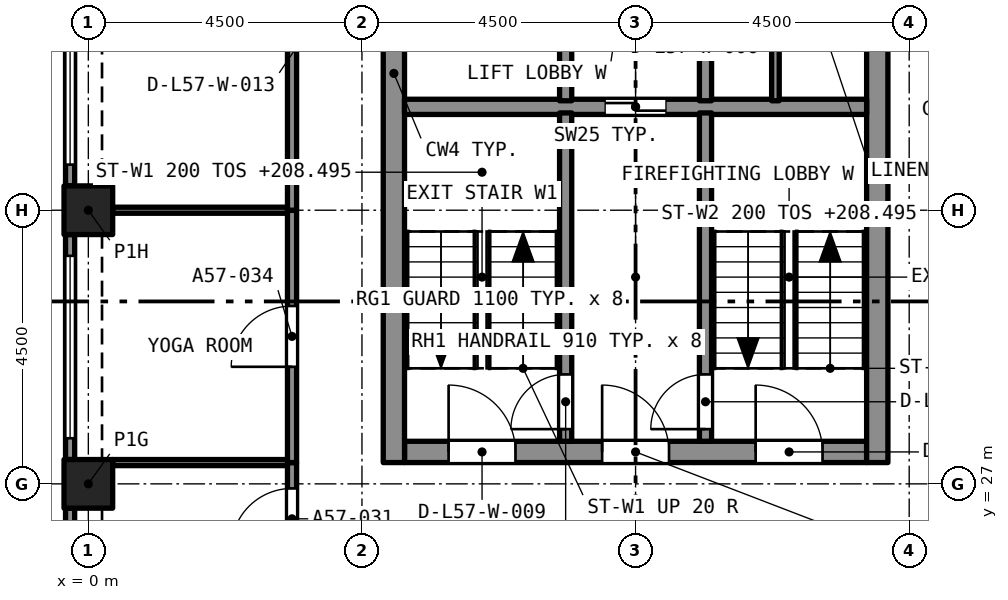
"""IFC4 building model, lengths in metres.
Left out: names, types, materials, properties, quantities, classifications, styles, units other than length and angle.
Written with IfcOpenShell. Run it as: python <this file> out.ifc"""

import sys

from ifc_helpers import new_model, si_unit, direction, frame, frame_2d, origin, origin_2d, place, context, subcontext, project, spatial, rectangle, extrude, element, fill, save


model = new_model("IFC4")
c1 = context("Model", 3, precision=1e-05, world=origin(), true_north=direction((0.0, 1.0)))
c2 = subcontext(c1, "Body", "Model", "MODEL_VIEW")
j1 = project(units=[si_unit("LENGTHUNIT", "METRE"), si_unit("PLANEANGLEUNIT", "RADIAN")], contexts=[c1])
p1 = place(None, origin())
s1 = spatial("IfcSite", under=j1, at=p1, CompositionType="ELEMENT")
p2 = place(p1, origin())
s2 = spatial("IfcBuilding", under=s1, at=p2, CompositionType="ELEMENT")
p3 = place(p2, frame((0.0, 0.0, 206.895)))
s3 = spatial("IfcBuildingStorey", under=s2, at=p3, CompositionType="ELEMENT", Elevation=206.895)
for number, where, z_axis, x_axis in (
    (1, (0.0, 27.0, 0.0), (0.0, 0.0, 1.0), (1.0, 0.0, 0.0)),
    (2, (0.0, 31.5, 0.0), (0.0, 0.0, 1.0), (1.0, 0.0, 0.0)),
):
    element("IfcColumn", number, at=place(p3, frame(where, z_axis=z_axis, x_axis=x_axis)), inside=s3, PredefinedType="COLUMN", context=c2, shape_type="SweptSolid", body=[
        extrude(rectangle(XDim=0.8, YDim=0.8, at=origin_2d()), origin(), (0.0, 0.0, 1.0), 3.2),
    ])
p4 = place(p3, frame((5.2, 27.525, 0.0), z_axis=(0.0, 0.0, 1.0), x_axis=(1.0, 0.0, 0.0)))
e3 = element("IfcWall", 3, at=p4, inside=s3, PredefinedType="SOLIDWALL", context=c2, shape_type="SweptSolid", body=[
    extrude(rectangle(XDim=7.6, YDim=0.35, at=frame_2d((3.8, 0.0))), origin(), (0.0, 0.0, 1.0), 3.2),
])
p5 = place(p4, frame((0.725, 0.0, 0.0)))
e4 = element("IfcOpeningElement", 4, at=p5, cuts=e3, PredefinedType="OPENING", context=c2, shape_type="SweptSolid", body=[
    extrude(rectangle(XDim=1.1, YDim=2.1, at=frame_2d((0.55, 1.05))), frame((0.0, 0.185, 0.0), z_axis=(0.0, -1.0, 0.0), x_axis=(1.0, 0.0, 0.0)), (0.0, 0.0, 1.0), 0.37),
])
p6 = place(p4, frame((3.25, 0.0, 0.0)))
e5 = element("IfcOpeningElement", 5, at=p6, cuts=e3, PredefinedType="OPENING", context=c2, shape_type="SweptSolid", body=[
    extrude(rectangle(XDim=1.1, YDim=2.1, at=frame_2d((0.55, 1.05))), frame((0.0, 0.185, 0.0), z_axis=(0.0, -1.0, 0.0), x_axis=(1.0, 0.0, 0.0)), (0.0, 0.0, 1.0), 0.37),
])
p7 = place(p4, frame((5.775, 0.0, 0.0)))
e6 = element("IfcOpeningElement", 6, at=p7, cuts=e3, PredefinedType="OPENING", context=c2, shape_type="SweptSolid", body=[
    extrude(rectangle(XDim=1.1, YDim=2.1, at=frame_2d((0.55, 1.05))), frame((0.0, 0.185, 0.0), z_axis=(0.0, -1.0, 0.0), x_axis=(1.0, 0.0, 0.0)), (0.0, 0.0, 1.0), 0.37),
])
p8 = place(p3, frame((5.025, 27.35, 0.0), z_axis=(0.0, 0.0, 1.0), x_axis=(0.0, 1.0, 0.0)))
e7 = element("IfcWall", 7, at=p8, inside=s3, PredefinedType="SOLIDWALL", context=c2, shape_type="SweptSolid", body=[
    extrude(rectangle(XDim=12.8, YDim=0.35, at=frame_2d((6.4, 0.0))), origin(), (0.0, 0.0, 1.0), 3.2),
])
p9 = place(p8, frame((8.6, 0.0, 0.0)))
e8 = element("IfcOpeningElement", 8, at=p9, cuts=e7, PredefinedType="OPENING", context=c2, shape_type="SweptSolid", body=[
    extrude(rectangle(XDim=1.2, YDim=2.1, at=frame_2d((0.6, 1.05))), frame((0.0, 0.185, 0.0), z_axis=(0.0, -1.0, 0.0), x_axis=(1.0, 0.0, 0.0)), (0.0, 0.0, 1.0), 0.37),
])
p10 = place(p3, frame((12.975, 27.35, 0.0), z_axis=(0.0, 0.0, 1.0), x_axis=(0.0, 1.0, 0.0)))
e9 = element("IfcWall", 9, at=p10, inside=s3, PredefinedType="SOLIDWALL", context=c2, shape_type="SweptSolid", body=[
    extrude(rectangle(XDim=12.8, YDim=0.35, at=frame_2d((6.4, 0.0))), origin(), (0.0, 0.0, 1.0), 3.2),
])
p11 = place(p10, frame((10.75, 0.0, 0.0)))
e10 = element("IfcOpeningElement", 10, at=p11, cuts=e9, PredefinedType="OPENING", context=c2, shape_type="SweptSolid", body=[
    extrude(rectangle(XDim=1.1, YDim=2.1, at=frame_2d((0.55, 1.05))), frame((0.0, 0.185, 0.0), z_axis=(0.0, -1.0, 0.0), x_axis=(1.0, 0.0, 0.0)), (0.0, 0.0, 1.0), 0.37),
])
p12 = place(p10, frame((8.6, 0.0, 0.0)))
e11 = element("IfcOpeningElement", 11, at=p12, cuts=e9, PredefinedType="OPENING", context=c2, shape_type="SweptSolid", body=[
    extrude(rectangle(XDim=1.2, YDim=2.1, at=frame_2d((0.6, 1.05))), frame((0.0, 0.185, 0.0), z_axis=(0.0, -1.0, 0.0), x_axis=(1.0, 0.0, 0.0)), (0.0, 0.0, 1.0), 0.37),
])
p13 = place(p3, frame((-0.3, 31.9, 0.0), z_axis=(0.0, 0.0, 1.0), x_axis=(0.0, 1.0, 0.0)))
e12 = element("IfcWall", 12, at=p13, inside=s3, PredefinedType="SOLIDWALL", context=c2, shape_type="SweptSolid", body=[
    extrude(rectangle(XDim=3.7, YDim=0.15, at=frame_2d((1.85, 0.0))), origin(), (0.0, 0.0, 1.0), 3.2),
])
p14 = place(p13, frame((0.35, 0.0, 0.45)))
e13 = element("IfcOpeningElement", 13, at=p14, cuts=e12, PredefinedType="OPENING", context=c2, shape_type="SweptSolid", body=[
    extrude(rectangle(XDim=3.0, YDim=1.95, at=frame_2d((1.5, 0.975))), frame((0.0, 0.085, 0.0), z_axis=(0.0, -1.0, 0.0), x_axis=(1.0, 0.0, 0.0)), (0.0, 0.0, 1.0), 0.17),
])
p15 = place(p3, frame((-0.3, 27.4, 0.0), z_axis=(0.0, 0.0, 1.0), x_axis=(0.0, 1.0, 0.0)))
e14 = element("IfcWall", 14, at=p15, inside=s3, PredefinedType="SOLIDWALL", context=c2, shape_type="SweptSolid", body=[
    extrude(rectangle(XDim=3.7, YDim=0.15, at=frame_2d((1.85, 0.0))), origin(), (0.0, 0.0, 1.0), 3.2),
])
p16 = place(p15, frame((0.35, 0.0, 0.45)))
e15 = element("IfcOpeningElement", 15, at=p16, cuts=e14, PredefinedType="OPENING", context=c2, shape_type="SweptSolid", body=[
    extrude(rectangle(XDim=3.0, YDim=1.95, at=frame_2d((1.5, 0.975))), frame((0.0, 0.085, 0.0), z_axis=(0.0, -1.0, 0.0), x_axis=(1.0, 0.0, 0.0)), (0.0, 0.0, 1.0), 0.17),
])
p17 = place(p3, frame((-0.3, 22.9, 0.0), z_axis=(0.0, 0.0, 1.0), x_axis=(0.0, 1.0, 0.0)))
e16 = element("IfcWall", 16, at=p17, inside=s3, PredefinedType="SOLIDWALL", context=c2, shape_type="SweptSolid", body=[
    extrude(rectangle(XDim=3.7, YDim=0.15, at=frame_2d((1.85, 0.0))), origin(), (0.0, 0.0, 1.0), 3.2),
])
p18 = place(p17, frame((0.35, 0.0, 0.45)))
e17 = element("IfcOpeningElement", 17, at=p18, cuts=e16, PredefinedType="OPENING", context=c2, shape_type="SweptSolid", body=[
    extrude(rectangle(XDim=3.0, YDim=1.95, at=frame_2d((1.5, 0.975))), frame((0.0, 0.085, 0.0), z_axis=(0.0, -1.0, 0.0), x_axis=(1.0, 0.0, 0.0)), (0.0, 0.0, 1.0), 0.17),
])
p19 = place(p3, frame((3.35, 25.425, 0.0), z_axis=(0.0, 0.0, 1.0), x_axis=(0.0, 1.0, 0.0)))
e18 = element("IfcWall", 18, at=p19, inside=s3, PredefinedType="PARTITIONING", context=c2, shape_type="SweptSolid", body=[
    extrude(rectangle(XDim=1.925, YDim=0.15, at=frame_2d((0.962, 0.0))), origin(), (0.0, 0.0, 1.0), 2.9),
])
p20 = place(p19, frame((0.5, 0.0, 0.0)))
e19 = element("IfcOpeningElement", 19, at=p20, cuts=e18, PredefinedType="OPENING", context=c2, shape_type="SweptSolid", body=[
    extrude(rectangle(XDim=1.0, YDim=2.1, at=frame_2d((0.5, 1.05))), frame((0.0, 0.085, 0.0), z_axis=(0.0, -1.0, 0.0), x_axis=(1.0, 0.0, 0.0)), (0.0, 0.0, 1.0), 0.17),
])
p21 = place(p3, frame((3.35, 27.35, 0.0), z_axis=(0.0, 0.0, 1.0), x_axis=(0.0, 1.0, 0.0)))
e20 = element("IfcWall", 20, at=p21, inside=s3, PredefinedType="PARTITIONING", context=c2, shape_type="SweptSolid", body=[
    extrude(rectangle(XDim=4.15, YDim=0.15, at=frame_2d((2.075, 0.0))), origin(), (0.0, 0.0, 1.0), 2.9),
])
p22 = place(p21, frame((1.575, 0.0, 0.0)))
e21 = element("IfcOpeningElement", 21, at=p22, cuts=e20, PredefinedType="OPENING", context=c2, shape_type="SweptSolid", body=[
    extrude(rectangle(XDim=1.0, YDim=2.1, at=frame_2d((0.5, 1.05))), frame((0.0, 0.085, 0.0), z_axis=(0.0, -1.0, 0.0), x_axis=(1.0, 0.0, 0.0)), (0.0, 0.0, 1.0), 0.17),
])
p23 = place(p3, frame((3.35, 31.5, 0.0), z_axis=(0.0, 0.0, 1.0), x_axis=(0.0, 1.0, 0.0)))
e22 = element("IfcWall", 22, at=p23, inside=s3, PredefinedType="PARTITIONING", context=c2, shape_type="SweptSolid", body=[
    extrude(rectangle(XDim=8.525, YDim=0.15, at=frame_2d((4.262, 0.0))), origin(), (0.0, 0.0, 1.0), 2.9),
])
p24 = place(p23, frame((3.825, 0.0, 0.0)))
e23 = element("IfcOpeningElement", 23, at=p24, cuts=e22, PredefinedType="OPENING", context=c2, shape_type="SweptSolid", body=[
    extrude(rectangle(XDim=1.0, YDim=2.1, at=frame_2d((0.5, 1.05))), frame((0.0, 0.085, 0.0), z_axis=(0.0, -1.0, 0.0), x_axis=(1.0, 0.0, 0.0)), (0.0, 0.0, 1.0), 0.17),
])
for number, where, z_axis, x_axis in (
    (24, (0.4, 27.35, 0.0), (0.0, 0.0, 1.0), (1.0, 0.0, 0.0)),
    (25, (0.4, 31.5, 0.0), (0.0, 0.0, 1.0), (1.0, 0.0, 0.0)),
):
    element("IfcWall", number, at=place(p3, frame(where, z_axis=z_axis, x_axis=x_axis)), inside=s3, PredefinedType="PARTITIONING", context=c2, shape_type="SweptSolid", body=[
        extrude(rectangle(XDim=2.875, YDim=0.1, at=frame_2d((1.438, 0.0))), origin(), (0.0, 0.0, 1.0), 2.9),
    ])
p25 = place(p3, frame((5.2, 33.2, 0.0), z_axis=(0.0, 0.0, 1.0), x_axis=(1.0, 0.0, 0.0)))
e26 = element("IfcWall", 26, at=p25, inside=s3, PredefinedType="SOLIDWALL", context=c2, shape_type="SweptSolid", body=[
    extrude(rectangle(XDim=7.6, YDim=0.25, at=frame_2d((3.8, 0.0))), origin(), (0.0, 0.0, 1.0), 2.9),
])
p26 = place(p25, frame((3.3, 0.0, 0.0)))
e27 = element("IfcOpeningElement", 27, at=p26, cuts=e26, PredefinedType="OPENING", context=c2, shape_type="SweptSolid", body=[
    extrude(rectangle(XDim=1.0, YDim=2.1, at=frame_2d((0.5, 1.05))), frame((0.0, 0.135, 0.0), z_axis=(0.0, -1.0, 0.0), x_axis=(1.0, 0.0, 0.0)), (0.0, 0.0, 1.0), 0.27),
])
p27 = place(p3, frame((7.85, 27.7, 0.0), z_axis=(0.0, 0.0, 1.0), x_axis=(0.0, 1.0, 0.0)))
e28 = element("IfcWall", 28, at=p27, inside=s3, PredefinedType="SOLIDWALL", context=c2, shape_type="SweptSolid", body=[
    extrude(rectangle(XDim=5.4, YDim=0.2, at=frame_2d((2.7, 0.0))), origin(), (0.0, 0.0, 1.0), 2.9),
])
p28 = place(p27, frame((0.2, 0.0, 0.0)))
e29 = element("IfcOpeningElement", 29, at=p28, cuts=e28, PredefinedType="OPENING", context=c2, shape_type="SweptSolid", body=[
    extrude(rectangle(XDim=0.9, YDim=2.1, at=frame_2d((0.45, 1.05))), frame((0.0, 0.11, 0.0), z_axis=(0.0, -1.0, 0.0), x_axis=(1.0, 0.0, 0.0)), (0.0, 0.0, 1.0), 0.22),
])
p29 = place(p3, frame((10.15, 27.7, 0.0), z_axis=(0.0, 0.0, 1.0), x_axis=(0.0, 1.0, 0.0)))
e30 = element("IfcWall", 30, at=p29, inside=s3, PredefinedType="SOLIDWALL", context=c2, shape_type="SweptSolid", body=[
    extrude(rectangle(XDim=5.4, YDim=0.2, at=frame_2d((2.7, 0.0))), origin(), (0.0, 0.0, 1.0), 2.9),
])
p30 = place(p29, frame((0.2, 0.0, 0.0)))
e31 = element("IfcOpeningElement", 31, at=p30, cuts=e30, PredefinedType="OPENING", context=c2, shape_type="SweptSolid", body=[
    extrude(rectangle(XDim=0.9, YDim=2.1, at=frame_2d((0.45, 1.05))), frame((0.0, 0.11, 0.0), z_axis=(0.0, -1.0, 0.0), x_axis=(1.0, 0.0, 0.0)), (0.0, 0.0, 1.0), 0.22),
])
for number, where, z_axis, x_axis in (
    (32, (7.85, 33.3, 0.0), (0.0, 0.0, 1.0), (0.0, 1.0, 0.0)),
    (33, (10.15, 33.3, 0.0), (0.0, 0.0, 1.0), (0.0, 1.0, 0.0)),
):
    element("IfcWall", number, at=place(p3, frame(where, z_axis=z_axis, x_axis=x_axis)), inside=s3, PredefinedType="SOLIDWALL", context=c2, shape_type="SweptSolid", body=[
        extrude(rectangle(XDim=2.3, YDim=0.2, at=frame_2d((1.15, 0.0))), origin(), (0.0, 0.0, 1.0), 2.9),
    ])
p31 = place(p3, frame((11.3, 33.3, 0.0), z_axis=(0.0, 0.0, 1.0), x_axis=(0.0, 1.0, 0.0)))
e34 = element("IfcWall", 34, at=p31, inside=s3, PredefinedType="PARTITIONING", context=c2, shape_type="SweptSolid", body=[
    extrude(rectangle(XDim=2.3, YDim=0.125, at=frame_2d((1.15, 0.0))), origin(), (0.0, 0.0, 1.0), 2.9),
])
p32 = place(p14, origin())
e35 = element("IfcWindow", 35, at=p32, inside=s3, PartitioningType="SINGLE_PANEL", PredefinedType="WINDOW", context=c2, shape_type="SweptSolid", body=[
    extrude(rectangle(XDim=3.0, YDim=1.95, at=frame_2d((1.5, 0.975))), frame((0.0, 0.03, 0.0), z_axis=(0.0, -1.0, 0.0), x_axis=(1.0, 0.0, 0.0)), (0.0, 0.0, 1.0), 0.06),
])
fill(e13, e35)
p33 = place(p16, origin())
e36 = element("IfcWindow", 36, at=p33, inside=s3, PartitioningType="SINGLE_PANEL", PredefinedType="WINDOW", context=c2, shape_type="SweptSolid", body=[
    extrude(rectangle(XDim=3.0, YDim=1.95, at=frame_2d((1.5, 0.975))), frame((0.0, 0.03, 0.0), z_axis=(0.0, -1.0, 0.0), x_axis=(1.0, 0.0, 0.0)), (0.0, 0.0, 1.0), 0.06),
])
fill(e15, e36)
p34 = place(p20, origin())
e37 = element("IfcDoor", 37, at=p34, inside=s3, OperationType="SINGLE_SWING_RIGHT", PredefinedType="DOOR", context=c2, shape_type="SweptSolid", body=[
    extrude(rectangle(XDim=1.0, YDim=2.1, at=frame_2d((0.5, 1.05))), frame((0.0, 0.025, 0.0), z_axis=(0.0, -1.0, 0.0), x_axis=(1.0, 0.0, 0.0)), (0.0, 0.0, 1.0), 0.05),
])
fill(e19, e37)
p35 = place(p22, origin())
e38 = element("IfcDoor", 38, at=p35, inside=s3, OperationType="SINGLE_SWING_RIGHT", PredefinedType="DOOR", context=c2, shape_type="SweptSolid", body=[
    extrude(rectangle(XDim=1.0, YDim=2.1, at=frame_2d((0.5, 1.05))), frame((0.0, 0.025, 0.0), z_axis=(0.0, -1.0, 0.0), x_axis=(1.0, 0.0, 0.0)), (0.0, 0.0, 1.0), 0.05),
])
fill(e21, e38)
p36 = place(p28, origin())
e39 = element("IfcDoor", 39, at=p36, inside=s3, OperationType="SINGLE_SWING_LEFT", PredefinedType="DOOR", context=c2, shape_type="SweptSolid", body=[
    extrude(rectangle(XDim=0.9, YDim=2.1, at=frame_2d((0.45, 1.05))), frame((0.0, 0.025, 0.0), z_axis=(0.0, -1.0, 0.0), x_axis=(1.0, 0.0, 0.0)), (0.0, 0.0, 1.0), 0.05),
])
fill(e29, e39)
p37 = place(p30, origin())
e40 = element("IfcDoor", 40, at=p37, inside=s3, OperationType="SINGLE_SWING_LEFT", PredefinedType="DOOR", context=c2, shape_type="SweptSolid", body=[
    extrude(rectangle(XDim=0.9, YDim=2.1, at=frame_2d((0.45, 1.05))), frame((0.0, 0.025, 0.0), z_axis=(0.0, -1.0, 0.0), x_axis=(1.0, 0.0, 0.0)), (0.0, 0.0, 1.0), 0.05),
])
fill(e31, e40)
p38 = place(p26, origin())
e41 = element("IfcDoor", 41, at=p38, inside=s3, OperationType="SLIDING_TO_LEFT", PredefinedType="DOOR", context=c2, shape_type="SweptSolid", body=[
    extrude(rectangle(XDim=1.0, YDim=2.1, at=frame_2d((0.5, 1.05))), frame((0.0, 0.025, 0.0), z_axis=(0.0, -1.0, 0.0), x_axis=(1.0, 0.0, 0.0)), (0.0, 0.0, 1.0), 0.05),
])
fill(e27, e41)
p39 = place(p5, origin())
e42 = element("IfcDoor", 42, at=p39, inside=s3, OperationType="SINGLE_SWING_LEFT", PredefinedType="DOOR", context=c2, shape_type="SweptSolid", body=[
    extrude(rectangle(XDim=1.1, YDim=2.1, at=frame_2d((0.55, 1.05))), frame((0.0, 0.025, 0.0), z_axis=(0.0, -1.0, 0.0), x_axis=(1.0, 0.0, 0.0)), (0.0, 0.0, 1.0), 0.05),
])
fill(e4, e42)
p40 = place(p6, origin())
e43 = element("IfcDoor", 43, at=p40, inside=s3, OperationType="SINGLE_SWING_LEFT", PredefinedType="DOOR", context=c2, shape_type="SweptSolid", body=[
    extrude(rectangle(XDim=1.1, YDim=2.1, at=frame_2d((0.55, 1.05))), frame((0.0, 0.025, 0.0), z_axis=(0.0, -1.0, 0.0), x_axis=(1.0, 0.0, 0.0)), (0.0, 0.0, 1.0), 0.05),
])
fill(e5, e43)
p41 = place(p7, origin())
e44 = element("IfcDoor", 44, at=p41, inside=s3, OperationType="SINGLE_SWING_LEFT", PredefinedType="DOOR", context=c2, shape_type="SweptSolid", body=[
    extrude(rectangle(XDim=1.1, YDim=2.1, at=frame_2d((0.55, 1.05))), frame((0.0, 0.025, 0.0), z_axis=(0.0, -1.0, 0.0), x_axis=(1.0, 0.0, 0.0)), (0.0, 0.0, 1.0), 0.05),
])
fill(e6, e44)
save(model, sys.argv[1])
